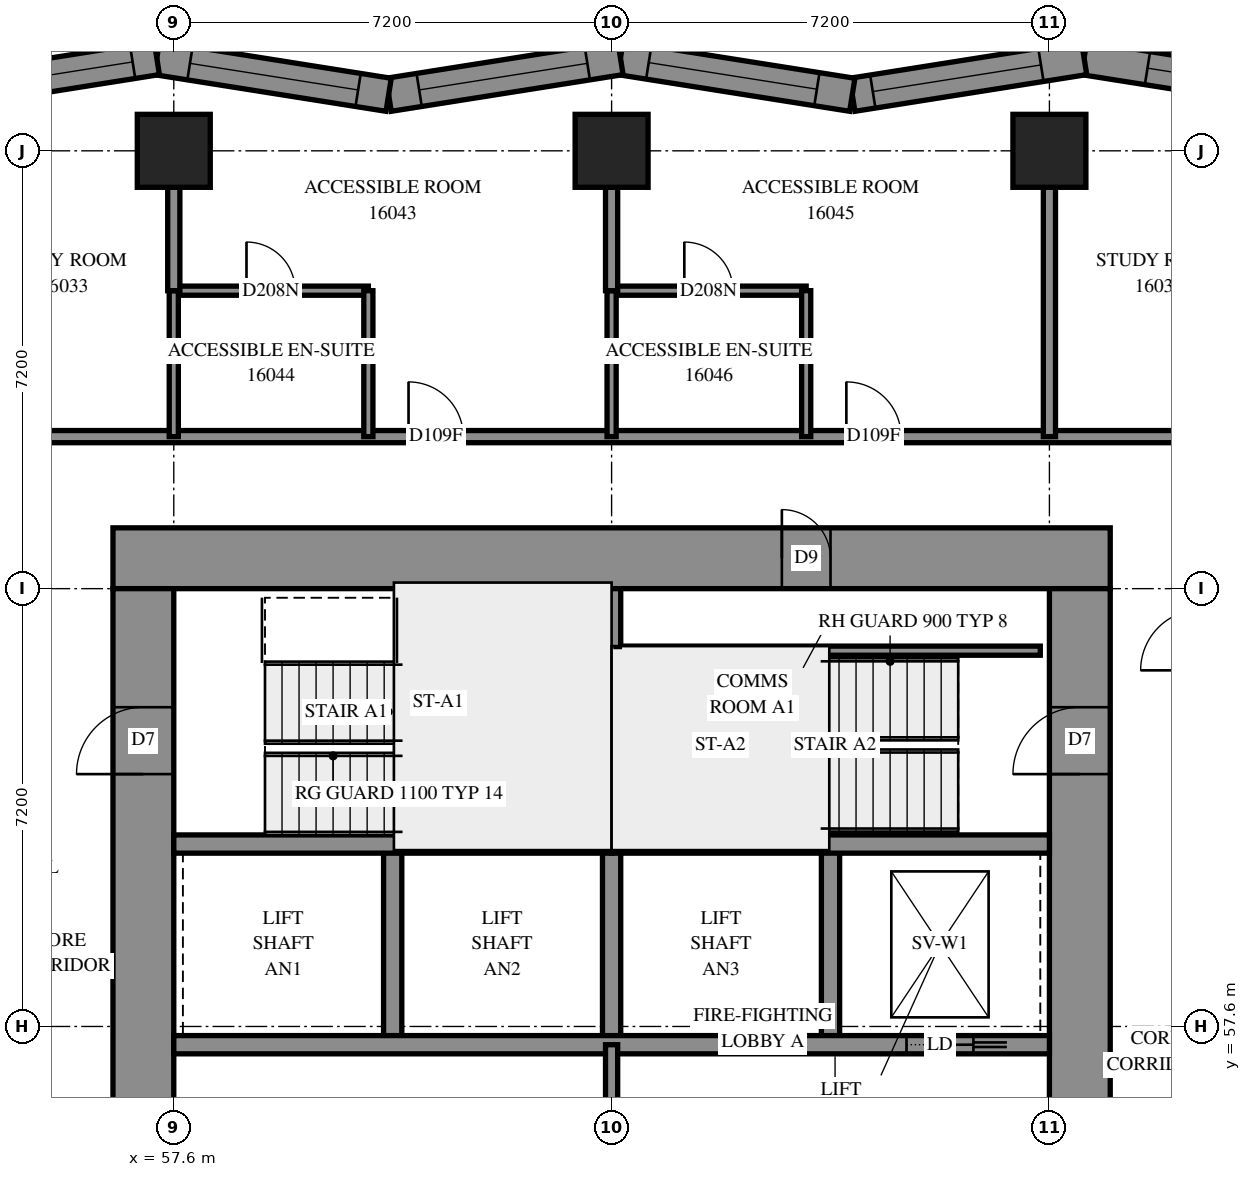
"""IFC4 building model, lengths in metres.
Left out: names, types, materials, properties, quantities, classifications, styles, units other than length and angle.
Written with IfcOpenShell. Run it as: python <this file> out.ifc"""

import sys

from ifc_helpers import new_model, si_unit, direction, frame, frame_2d, origin, origin_2d, place, context, subcontext, project, spatial, polyline, rectangle, outline, extrude, element, fill, save


model = new_model("IFC4")
c1 = context("Model", 3, precision=1e-05, world=origin(), true_north=direction((0.0, 1.0)))
c2 = subcontext(c1, "Body", "Model", "MODEL_VIEW")
j1 = project(units=[si_unit("LENGTHUNIT", "METRE"), si_unit("PLANEANGLEUNIT", "RADIAN")], contexts=[c1])
p1 = place(None, origin())
s1 = spatial("IfcSite", under=j1, at=p1, CompositionType="ELEMENT")
p2 = place(p1, origin())
s2 = spatial("IfcBuilding", under=s1, at=p2, CompositionType="ELEMENT")
p3 = place(p2, frame((0.0, 0.0, 61.0)))
s3 = spatial("IfcBuildingStorey", under=s2, at=p3, CompositionType="ELEMENT", Elevation=61.0)
for number, where, z_axis, x_axis in (
    (1, (57.6, 72.0, 0.0), (0.0, 0.0, 1.0), (1.0, 0.0, 0.0)),
    (2, (64.8, 72.0, 0.0), (0.0, 0.0, 1.0), (1.0, 0.0, 0.0)),
    (3, (72.0, 72.0, 0.0), (0.0, 0.0, 1.0), (1.0, 0.0, 0.0)),
):
    element("IfcColumn", number, at=place(p3, frame(where, z_axis=z_axis, x_axis=x_axis)), inside=s3, PredefinedType="COLUMN", context=c2, shape_type="SweptSolid", body=[
        extrude(rectangle(XDim=1.2, YDim=1.2, at=origin_2d()), origin(), (0.0, 0.0, 1.0), 3.1),
    ])
p4 = place(p3, frame((56.6, 65.3, -0.3), z_axis=(0.0, 0.0, 1.0), x_axis=(1.0, 0.0, 0.0)))
e4 = element("IfcWall", 4, at=p4, inside=s3, PredefinedType="SHEAR", context=c2, shape_type="SweptSolid", body=[
    extrude(rectangle(XDim=16.4, YDim=1.0, at=frame_2d((8.2, 0.0))), origin(), (0.0, 0.0, 1.0), 2.7),
])
p5 = place(p4, frame((11.0, 0.0, 0.3)))
e5 = element("IfcOpeningElement", 5, at=p5, cuts=e4, PredefinedType="OPENING", context=c2, shape_type="SweptSolid", body=[
    extrude(rectangle(XDim=0.8, YDim=2.1, at=frame_2d((0.4, 1.05))), frame((0.0, 0.51, 0.0), z_axis=(0.0, -1.0, 0.0), x_axis=(1.0, 0.0, 0.0)), (0.0, 0.0, 1.0), 1.02),
])
p6 = place(p3, frame((57.1, 50.4, -0.3), z_axis=(0.0, 0.0, 1.0), x_axis=(0.0, 1.0, 0.0)))
e6 = element("IfcWall", 6, at=p6, inside=s3, PredefinedType="SHEAR", context=c2, shape_type="SweptSolid", body=[
    extrude(rectangle(XDim=14.4, YDim=1.0, at=frame_2d((7.2, 0.0))), origin(), (0.0, 0.0, 1.0), 2.7),
])
p7 = place(p6, frame((4.55, 0.0, 0.3)))
e7 = element("IfcOpeningElement", 7, at=p7, cuts=e6, PredefinedType="OPENING", context=c2, shape_type="SweptSolid", body=[
    extrude(rectangle(XDim=1.1, YDim=2.1, at=frame_2d((0.55, 1.05))), frame((0.0, 0.51, 0.0), z_axis=(0.0, -1.0, 0.0), x_axis=(1.0, 0.0, 0.0)), (0.0, 0.0, 1.0), 1.02),
])
p8 = place(p6, frame((11.35, 0.0, 0.3)))
e8 = element("IfcOpeningElement", 8, at=p8, cuts=e6, PredefinedType="OPENING", context=c2, shape_type="SweptSolid", body=[
    extrude(rectangle(XDim=1.1, YDim=2.1, at=frame_2d((0.55, 1.05))), frame((0.0, 0.51, 0.0), z_axis=(0.0, -1.0, 0.0), x_axis=(1.0, 0.0, 0.0)), (0.0, 0.0, 1.0), 1.02),
])
p9 = place(p3, frame((72.5, 50.4, -0.3), z_axis=(0.0, 0.0, 1.0), x_axis=(0.0, 1.0, 0.0)))
e9 = element("IfcWall", 9, at=p9, inside=s3, PredefinedType="SHEAR", context=c2, shape_type="SweptSolid", body=[
    extrude(rectangle(XDim=14.4, YDim=1.0, at=frame_2d((7.2, 0.0))), origin(), (0.0, 0.0, 1.0), 2.7),
])
p10 = place(p9, frame((4.55, 0.0, 0.3)))
e10 = element("IfcOpeningElement", 10, at=p10, cuts=e9, PredefinedType="OPENING", context=c2, shape_type="SweptSolid", body=[
    extrude(rectangle(XDim=1.1, YDim=2.1, at=frame_2d((0.55, 1.05))), frame((0.0, 0.51, 0.0), z_axis=(0.0, -1.0, 0.0), x_axis=(1.0, 0.0, 0.0)), (0.0, 0.0, 1.0), 1.02),
])
p11 = place(p9, frame((11.35, 0.0, 0.3)))
e11 = element("IfcOpeningElement", 11, at=p11, cuts=e9, PredefinedType="OPENING", context=c2, shape_type="SweptSolid", body=[
    extrude(rectangle(XDim=1.1, YDim=2.1, at=frame_2d((0.55, 1.05))), frame((0.0, 0.51, 0.0), z_axis=(0.0, -1.0, 0.0), x_axis=(1.0, 0.0, 0.0)), (0.0, 0.0, 1.0), 1.02),
])
for number, where, z_axis, x_axis in (
    (12, (61.2, 57.3, 0.0), (0.0, 0.0, 1.0), (0.0, 1.0, 0.0)),
    (13, (64.8, 57.3, 0.0), (0.0, 0.0, 1.0), (0.0, 1.0, 0.0)),
    (14, (68.4, 57.3, 0.0), (0.0, 0.0, 1.0), (0.0, 1.0, 0.0)),
):
    element("IfcWall", number, at=place(p3, frame(where, z_axis=z_axis, x_axis=x_axis)), inside=s3, PredefinedType="SOLIDWALL", context=c2, shape_type="SweptSolid", body=[
        extrude(rectangle(XDim=3.3, YDim=0.3, at=frame_2d((1.65, 0.0))), origin(), (0.0, 0.0, 1.0), 3.1),
    ])
p12 = place(p3, frame((57.6, 57.3, 0.0), z_axis=(0.0, 0.0, 1.0), x_axis=(1.0, 0.0, 0.0)))
e15 = element("IfcWall", 15, at=p12, inside=s3, PredefinedType="SOLIDWALL", context=c2, shape_type="SweptSolid", body=[
    extrude(rectangle(XDim=14.4, YDim=0.3, at=frame_2d((7.2, 0.0))), origin(), (0.0, 0.0, 1.0), 3.1),
])
p13 = place(p12, frame((12.05, 0.0, 0.0)))
e16 = element("IfcOpeningElement", 16, at=p13, cuts=e15, PredefinedType="OPENING", context=c2, shape_type="SweptSolid", body=[
    extrude(rectangle(XDim=1.1, YDim=2.1, at=frame_2d((0.55, 1.05))), frame((0.0, 0.16, 0.0), z_axis=(0.0, -1.0, 0.0), x_axis=(1.0, 0.0, 0.0)), (0.0, 0.0, 1.0), 0.32),
])
for number, where, z_axis, x_axis in (
    (17, (57.6, 60.6, 0.0), (0.0, 0.0, 1.0), (1.0, 0.0, 0.0)),
    (18, (64.8, 60.6, 0.0), (0.0, 0.0, 1.0), (1.0, 0.0, 0.0)),
):
    element("IfcWall", number, at=place(p3, frame(where, z_axis=z_axis, x_axis=x_axis)), inside=s3, PredefinedType="SOLIDWALL", context=c2, shape_type="SweptSolid", body=[
        extrude(rectangle(XDim=7.2, YDim=0.3, at=frame_2d((3.6, 0.0))), origin(), (0.0, 0.0, 1.0), 3.1),
    ])
p14 = place(p3, frame((64.8, 60.6, 0.0), z_axis=(0.0, 0.0, 1.0), x_axis=(0.0, 1.0, 0.0)))
e19 = element("IfcWall", 19, at=p14, inside=s3, PredefinedType="SOLIDWALL", context=c2, shape_type="SweptSolid", body=[
    extrude(rectangle(XDim=4.2, YDim=0.3, at=frame_2d((2.1, 0.0))), origin(), (0.0, 0.0, 1.0), 3.1),
])
p15 = place(p3, frame((76.404, 72.918, 0.0), z_axis=(0.0, 0.0, 1.0), x_axis=(-0.9877221932, 0.1562205785, 0.0)))
e20 = element("IfcWall", 20, at=p15, inside=s3, PredefinedType="SOLIDWALL", context=c2, shape_type="SweptSolid", body=[
    extrude(outline(polyline([(0.065, -0.275), (3.925, -0.275), (3.838, 0.275), (-0.065, 0.275), (0.065, -0.275)])), origin(), (0.0, 0.0, 1.0), 3.1),
])
p16 = place(p15, frame((1.626, 0.0, 0.5)))
e21 = element("IfcOpeningElement", 21, at=p16, cuts=e20, PredefinedType="OPENING", context=c2, shape_type="SweptSolid", body=[
    extrude(rectangle(XDim=1.2, YDim=2.45, at=frame_2d((0.6, 1.225))), frame((0.0, 0.285, 0.0), z_axis=(0.0, -1.0, 0.0), x_axis=(1.0, 0.0, 0.0)), (0.0, 0.0, 1.0), 0.57),
])
p17 = place(p3, frame((72.571, 73.525, 0.0), z_axis=(0.0, 0.0, 1.0), x_axis=(-0.9877213372, -0.1562259905, 0.0)))
e22 = element("IfcWall", 22, at=p17, inside=s3, PredefinedType="SOLIDWALL", context=c2, shape_type="SweptSolid", body=[
    extrude(outline(polyline([(-0.043, -0.275), (3.816, -0.275), (3.903, 0.275), (0.043, 0.275), (-0.043, -0.275)])), origin(), (0.0, 0.0, 1.0), 3.1),
])
p18 = place(p17, frame((0.719, 0.0, 0.5)))
e23 = element("IfcOpeningElement", 23, at=p18, cuts=e22, PredefinedType="OPENING", context=c2, shape_type="SweptSolid", body=[
    extrude(rectangle(XDim=2.8, YDim=2.45, at=frame_2d((1.4, 1.225))), frame((0.0, 0.285, 0.0), z_axis=(0.0, -1.0, 0.0), x_axis=(1.0, 0.0, 0.0)), (0.0, 0.0, 1.0), 0.57),
])
p19 = place(p3, frame((68.758, 72.922, 0.0), z_axis=(0.0, 0.0, 1.0), x_axis=(-0.9877213372, 0.1562259905, 0.0)))
e24 = element("IfcWall", 24, at=p19, inside=s3, PredefinedType="SOLIDWALL", context=c2, shape_type="SweptSolid", body=[
    extrude(outline(polyline([(0.043, -0.275), (3.903, -0.275), (3.816, 0.275), (-0.043, 0.275), (0.043, -0.275)])), origin(), (0.0, 0.0, 1.0), 3.1),
])
p20 = place(p19, frame((0.59, 0.0, 0.5)))
e25 = element("IfcOpeningElement", 25, at=p20, cuts=e24, PredefinedType="OPENING", context=c2, shape_type="SweptSolid", body=[
    extrude(rectangle(XDim=2.8, YDim=2.45, at=frame_2d((1.4, 1.225))), frame((0.0, 0.285, 0.0), z_axis=(0.0, -1.0, 0.0), x_axis=(1.0, 0.0, 0.0)), (0.0, 0.0, 1.0), 0.57),
])
p21 = place(p3, frame((64.946, 73.525, 0.0), z_axis=(0.0, 0.0, 1.0), x_axis=(-0.9877213372, -0.1562259905, 0.0)))
e26 = element("IfcWall", 26, at=p21, inside=s3, PredefinedType="SOLIDWALL", context=c2, shape_type="SweptSolid", body=[
    extrude(outline(polyline([(-0.043, -0.275), (3.816, -0.275), (3.903, 0.275), (0.043, 0.275), (-0.043, -0.275)])), origin(), (0.0, 0.0, 1.0), 3.1),
])
p22 = place(p21, frame((0.552, 0.0, 0.5)))
e27 = element("IfcOpeningElement", 27, at=p22, cuts=e26, PredefinedType="OPENING", context=c2, shape_type="SweptSolid", body=[
    extrude(rectangle(XDim=2.8, YDim=2.45, at=frame_2d((1.4, 1.225))), frame((0.0, 0.285, 0.0), z_axis=(0.0, -1.0, 0.0), x_axis=(1.0, 0.0, 0.0)), (0.0, 0.0, 1.0), 0.57),
])
p23 = place(p3, frame((61.133, 72.922, 0.0), z_axis=(0.0, 0.0, 1.0), x_axis=(-0.9877213372, 0.1562259905, 0.0)))
e28 = element("IfcWall", 28, at=p23, inside=s3, PredefinedType="SOLIDWALL", context=c2, shape_type="SweptSolid", body=[
    extrude(outline(polyline([(0.043, -0.275), (3.903, -0.275), (3.816, 0.275), (-0.043, 0.275), (0.043, -0.275)])), origin(), (0.0, 0.0, 1.0), 3.1),
])
p24 = place(p23, frame((0.508, 0.0, 0.5)))
e29 = element("IfcOpeningElement", 29, at=p24, cuts=e28, PredefinedType="OPENING", context=c2, shape_type="SweptSolid", body=[
    extrude(rectangle(XDim=2.8, YDim=2.45, at=frame_2d((1.4, 1.225))), frame((0.0, 0.285, 0.0), z_axis=(0.0, -1.0, 0.0), x_axis=(1.0, 0.0, 0.0)), (0.0, 0.0, 1.0), 0.57),
])
p25 = place(p3, frame((57.321, 73.525, 0.0), z_axis=(0.0, 0.0, 1.0), x_axis=(-0.9877213372, -0.1562259905, 0.0)))
e30 = element("IfcWall", 30, at=p25, inside=s3, PredefinedType="SOLIDWALL", context=c2, shape_type="SweptSolid", body=[
    extrude(outline(polyline([(-0.043, -0.275), (3.816, -0.275), (3.903, 0.275), (0.043, 0.275), (-0.043, -0.275)])), origin(), (0.0, 0.0, 1.0), 3.1),
])
p26 = place(p25, frame((0.403, 0.0, 0.5)))
e31 = element("IfcOpeningElement", 31, at=p26, cuts=e30, PredefinedType="OPENING", context=c2, shape_type="SweptSolid", body=[
    extrude(rectangle(XDim=2.8, YDim=2.45, at=frame_2d((1.4, 1.225))), frame((0.0, 0.285, 0.0), z_axis=(0.0, -1.0, 0.0), x_axis=(1.0, 0.0, 0.0)), (0.0, 0.0, 1.0), 0.57),
])
p27 = place(p3, frame((64.95, 63.78, 0.0), z_axis=(0.0, 0.0, 1.0), x_axis=(1.0, 0.0, 0.0)))
e32 = element("IfcWall", 32, at=p27, inside=s3, PredefinedType="PARTITIONING", context=c2, shape_type="SweptSolid", body=[
    extrude(rectangle(XDim=6.9, YDim=0.15, at=frame_2d((3.45, 0.0))), origin(), (0.0, 0.0, 1.0), 3.1),
])
p28 = place(p3, frame((64.8, 53.7, 0.0), z_axis=(0.0, 0.0, 1.0), x_axis=(0.0, 1.0, 0.0)))
e33 = element("IfcWall", 33, at=p28, inside=s3, PredefinedType="PARTITIONING", context=c2, shape_type="SweptSolid", body=[
    extrude(rectangle(XDim=3.6, YDim=0.2, at=frame_2d((1.8, 0.0))), origin(), (0.0, 0.0, 1.0), 3.1),
])
p29 = place(p3, frame((55.1, 67.3, 0.0), z_axis=(0.0, 0.0, 1.0), x_axis=(1.0, 0.0, 0.0)))
e34 = element("IfcWall", 34, at=p29, inside=s3, PredefinedType="PARTITIONING", context=c2, shape_type="SweptSolid", body=[
    extrude(rectangle(XDim=19.4, YDim=0.2, at=frame_2d((9.7, 0.0))), origin(), (0.0, 0.0, 1.0), 3.1),
])
p30 = place(p29, frame((6.361, 0.0, 0.0)))
e35 = element("IfcOpeningElement", 35, at=p30, cuts=e34, PredefinedType="OPENING", context=c2, shape_type="SweptSolid", body=[
    extrude(rectangle(XDim=0.9, YDim=2.1, at=frame_2d((0.45, 1.05))), frame((0.0, 0.11, 0.0), z_axis=(0.0, -1.0, 0.0), x_axis=(1.0, 0.0, 0.0)), (0.0, 0.0, 1.0), 0.22),
])
p31 = place(p29, frame((13.561, 0.0, 0.0)))
e36 = element("IfcOpeningElement", 36, at=p31, cuts=e34, PredefinedType="OPENING", context=c2, shape_type="SweptSolid", body=[
    extrude(rectangle(XDim=0.9, YDim=2.1, at=frame_2d((0.45, 1.05))), frame((0.0, 0.11, 0.0), z_axis=(0.0, -1.0, 0.0), x_axis=(1.0, 0.0, 0.0)), (0.0, 0.0, 1.0), 0.22),
])
p32 = place(p3, frame((72.0, 67.3, 0.0), z_axis=(0.0, 0.0, 1.0), x_axis=(0.0, 1.0, 0.0)))
e37 = element("IfcWall", 37, at=p32, inside=s3, PredefinedType="PARTITIONING", context=c2, shape_type="SweptSolid", body=[
    extrude(rectangle(XDim=4.1, YDim=0.2, at=frame_2d((2.05, 0.0))), origin(), (0.0, 0.0, 1.0), 3.1),
])
p33 = place(p3, frame((64.8, 69.7, 0.0), z_axis=(0.0, 0.0, 1.0), x_axis=(1.0, 0.0, 0.0)))
e38 = element("IfcWall", 38, at=p33, inside=s3, PredefinedType="PARTITIONING", context=c2, shape_type="SweptSolid", body=[
    extrude(rectangle(XDim=3.2, YDim=0.15, at=frame_2d((1.6, 0.0))), origin(), (0.0, 0.0, 1.0), 3.1),
])
p34 = place(p33, frame((1.196, 0.0, 0.0)))
e39 = element("IfcOpeningElement", 39, at=p34, cuts=e38, PredefinedType="OPENING", context=c2, shape_type="SweptSolid", body=[
    extrude(rectangle(XDim=0.8, YDim=2.1, at=frame_2d((0.4, 1.05))), frame((0.0, 0.085, 0.0), z_axis=(0.0, -1.0, 0.0), x_axis=(1.0, 0.0, 0.0)), (0.0, 0.0, 1.0), 0.17),
])
p35 = place(p3, frame((57.6, 69.7, 0.0), z_axis=(0.0, 0.0, 1.0), x_axis=(1.0, 0.0, 0.0)))
e40 = element("IfcWall", 40, at=p35, inside=s3, PredefinedType="PARTITIONING", context=c2, shape_type="SweptSolid", body=[
    extrude(rectangle(XDim=3.2, YDim=0.15, at=frame_2d((1.6, 0.0))), origin(), (0.0, 0.0, 1.0), 3.1),
])
p36 = place(p35, frame((1.196, 0.0, 0.0)))
e41 = element("IfcOpeningElement", 41, at=p36, cuts=e40, PredefinedType="OPENING", context=c2, shape_type="SweptSolid", body=[
    extrude(rectangle(XDim=0.8, YDim=2.1, at=frame_2d((0.4, 1.05))), frame((0.0, 0.085, 0.0), z_axis=(0.0, -1.0, 0.0), x_axis=(1.0, 0.0, 0.0)), (0.0, 0.0, 1.0), 0.17),
])
for number, where, z_axis, x_axis in (
    (42, (57.6, 67.3, 0.0), (0.0, 0.0, 1.0), (0.0, 1.0, 0.0)),
    (43, (60.8, 67.3, 0.0), (0.0, 0.0, 1.0), (0.0, 1.0, 0.0)),
    (44, (68.0, 67.3, 0.0), (0.0, 0.0, 1.0), (0.0, 1.0, 0.0)),
    (45, (64.8, 67.3, 0.0), (0.0, 0.0, 1.0), (0.0, 1.0, 0.0)),
):
    element("IfcWall", number, at=place(p3, frame(where, z_axis=z_axis, x_axis=x_axis)), inside=s3, PredefinedType="PARTITIONING", context=c2, shape_type="SweptSolid", body=[
        extrude(rectangle(XDim=2.4, YDim=0.15, at=frame_2d((1.2, 0.0))), origin(), (0.0, 0.0, 1.0), 3.1),
    ])
for number, where, z_axis, x_axis in (
    (46, (57.6, 69.7, 0.0), (0.0, 0.0, 1.0), (0.0, 1.0, 0.0)),
    (47, (64.8, 69.7, 0.0), (0.0, 0.0, 1.0), (0.0, 1.0, 0.0)),
):
    element("IfcWall", number, at=place(p3, frame(where, z_axis=z_axis, x_axis=x_axis)), inside=s3, PredefinedType="PARTITIONING", context=c2, shape_type="SweptSolid", body=[
        extrude(rectangle(XDim=1.7, YDim=0.2, at=frame_2d((0.85, 0.0))), origin(), (0.0, 0.0, 1.0), 3.1),
    ])
p37 = place(p16, origin())
e48 = element("IfcWindow", 48, at=p37, inside=s3, PartitioningType="SINGLE_PANEL", PredefinedType="WINDOW", context=c2, shape_type="SweptSolid", body=[
    extrude(rectangle(XDim=1.2, YDim=2.45, at=frame_2d((0.6, 1.225))), frame((0.0, 0.155, 0.0), z_axis=(0.0, -1.0, 0.0), x_axis=(1.0, 0.0, 0.0)), (0.0, 0.0, 1.0), 0.06),
])
fill(e21, e48)
p38 = place(p18, origin())
e49 = element("IfcWindow", 49, at=p38, inside=s3, PartitioningType="SINGLE_PANEL", PredefinedType="WINDOW", context=c2, shape_type="SweptSolid", body=[
    extrude(rectangle(XDim=2.8, YDim=2.45, at=frame_2d((1.4, 1.225))), frame((0.0, 0.155, 0.0), z_axis=(0.0, -1.0, 0.0), x_axis=(1.0, 0.0, 0.0)), (0.0, 0.0, 1.0), 0.06),
])
fill(e23, e49)
p39 = place(p20, origin())
e50 = element("IfcWindow", 50, at=p39, inside=s3, PartitioningType="SINGLE_PANEL", PredefinedType="WINDOW", context=c2, shape_type="SweptSolid", body=[
    extrude(rectangle(XDim=2.8, YDim=2.45, at=frame_2d((1.4, 1.225))), frame((0.0, 0.155, 0.0), z_axis=(0.0, -1.0, 0.0), x_axis=(1.0, 0.0, 0.0)), (0.0, 0.0, 1.0), 0.06),
])
fill(e25, e50)
p40 = place(p22, origin())
e51 = element("IfcWindow", 51, at=p40, inside=s3, PartitioningType="SINGLE_PANEL", PredefinedType="WINDOW", context=c2, shape_type="SweptSolid", body=[
    extrude(rectangle(XDim=2.8, YDim=2.45, at=frame_2d((1.4, 1.225))), frame((0.0, 0.155, 0.0), z_axis=(0.0, -1.0, 0.0), x_axis=(1.0, 0.0, 0.0)), (0.0, 0.0, 1.0), 0.06),
])
fill(e27, e51)
p41 = place(p24, origin())
e52 = element("IfcWindow", 52, at=p41, inside=s3, PartitioningType="SINGLE_PANEL", PredefinedType="WINDOW", context=c2, shape_type="SweptSolid", body=[
    extrude(rectangle(XDim=2.8, YDim=2.45, at=frame_2d((1.4, 1.225))), frame((0.0, 0.155, 0.0), z_axis=(0.0, -1.0, 0.0), x_axis=(1.0, 0.0, 0.0)), (0.0, 0.0, 1.0), 0.06),
])
fill(e29, e52)
p42 = place(p26, origin())
e53 = element("IfcWindow", 53, at=p42, inside=s3, PartitioningType="SINGLE_PANEL", PredefinedType="WINDOW", context=c2, shape_type="SweptSolid", body=[
    extrude(rectangle(XDim=2.8, YDim=2.45, at=frame_2d((1.4, 1.225))), frame((0.0, 0.155, 0.0), z_axis=(0.0, -1.0, 0.0), x_axis=(1.0, 0.0, 0.0)), (0.0, 0.0, 1.0), 0.06),
])
fill(e31, e53)
p43 = place(p5, origin())
e54 = element("IfcDoor", 54, at=p43, inside=s3, OperationType="SINGLE_SWING_RIGHT", PredefinedType="DOOR", context=c2, shape_type="SweptSolid", body=[
    extrude(rectangle(XDim=0.8, YDim=2.1, at=frame_2d((0.4, 1.05))), frame((0.0, -0.44, 0.0), z_axis=(0.0, -1.0, 0.0), x_axis=(1.0, 0.0, 0.0)), (0.0, 0.0, 1.0), 0.05),
])
fill(e5, e54)
p44 = place(p8, origin())
e55 = element("IfcDoor", 55, at=p44, inside=s3, OperationType="SINGLE_SWING_LEFT", PredefinedType="DOOR", context=c2, shape_type="SweptSolid", body=[
    extrude(rectangle(XDim=1.1, YDim=2.1, at=frame_2d((0.55, 1.05))), frame((0.0, 0.025, 0.0), z_axis=(0.0, -1.0, 0.0), x_axis=(1.0, 0.0, 0.0)), (0.0, 0.0, 1.0), 0.05),
])
fill(e8, e55)
p45 = place(p11, origin())
e56 = element("IfcDoor", 56, at=p45, inside=s3, OperationType="SINGLE_SWING_RIGHT", PredefinedType="DOOR", context=c2, shape_type="SweptSolid", body=[
    extrude(rectangle(XDim=1.1, YDim=2.1, at=frame_2d((0.55, 1.05))), frame((0.0, 0.025, 0.0), z_axis=(0.0, -1.0, 0.0), x_axis=(1.0, 0.0, 0.0)), (0.0, 0.0, 1.0), 0.05),
])
fill(e11, e56)
p46 = place(p13, origin())
e57 = element("IfcDoor", 57, at=p46, inside=s3, OperationType="SLIDING_TO_RIGHT", PredefinedType="DOOR", context=c2, shape_type="SweptSolid", body=[
    extrude(rectangle(XDim=1.1, YDim=2.1, at=frame_2d((0.55, 1.05))), frame((0.0, 0.025, 0.0), z_axis=(0.0, -1.0, 0.0), x_axis=(1.0, 0.0, 0.0)), (0.0, 0.0, 1.0), 0.05),
])
fill(e16, e57)
p47 = place(p30, origin())
e58 = element("IfcDoor", 58, at=p47, inside=s3, OperationType="SINGLE_SWING_RIGHT", PredefinedType="DOOR", context=c2, shape_type="SweptSolid", body=[
    extrude(rectangle(XDim=0.9, YDim=2.1, at=frame_2d((0.45, 1.05))), frame((0.0, 0.025, 0.0), z_axis=(0.0, -1.0, 0.0), x_axis=(1.0, 0.0, 0.0)), (0.0, 0.0, 1.0), 0.05),
])
fill(e35, e58)
p48 = place(p36, origin())
e59 = element("IfcDoor", 59, at=p48, inside=s3, OperationType="SINGLE_SWING_RIGHT", PredefinedType="DOOR", context=c2, shape_type="SweptSolid", body=[
    extrude(rectangle(XDim=0.8, YDim=2.1, at=frame_2d((0.4, 1.05))), frame((0.0, 0.025, 0.0), z_axis=(0.0, -1.0, 0.0), x_axis=(1.0, 0.0, 0.0)), (0.0, 0.0, 1.0), 0.05),
])
fill(e41, e59)
p49 = place(p31, origin())
e60 = element("IfcDoor", 60, at=p49, inside=s3, OperationType="SINGLE_SWING_RIGHT", PredefinedType="DOOR", context=c2, shape_type="SweptSolid", body=[
    extrude(rectangle(XDim=0.9, YDim=2.1, at=frame_2d((0.45, 1.05))), frame((0.0, 0.025, 0.0), z_axis=(0.0, -1.0, 0.0), x_axis=(1.0, 0.0, 0.0)), (0.0, 0.0, 1.0), 0.05),
])
fill(e36, e60)
p50 = place(p34, origin())
e61 = element("IfcDoor", 61, at=p50, inside=s3, OperationType="SINGLE_SWING_RIGHT", PredefinedType="DOOR", context=c2, shape_type="SweptSolid", body=[
    extrude(rectangle(XDim=0.8, YDim=2.1, at=frame_2d((0.4, 1.05))), frame((0.0, 0.025, 0.0), z_axis=(0.0, -1.0, 0.0), x_axis=(1.0, 0.0, 0.0)), (0.0, 0.0, 1.0), 0.05),
])
fill(e39, e61)
save(model, sys.argv[1])
